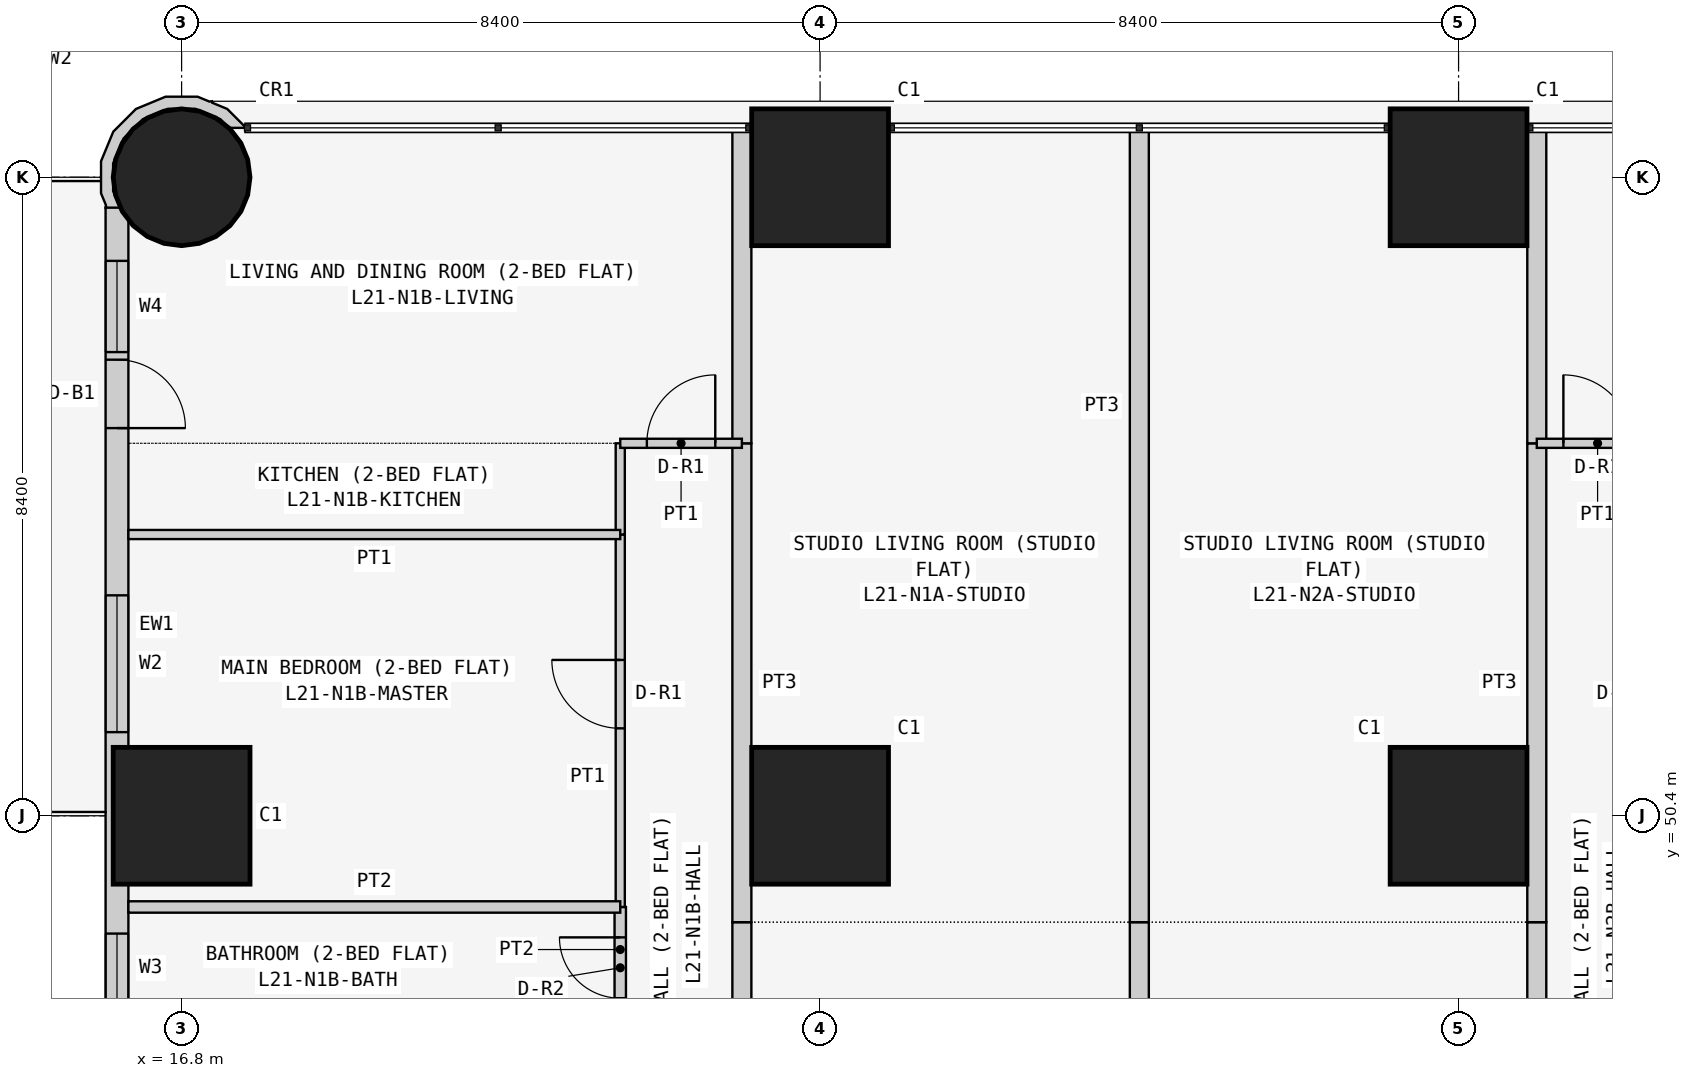
"""IFC4 building model, lengths in metres.
Left out: names, types, materials, properties, quantities, classifications, styles, units other than length and angle.
Written with IfcOpenShell. Run it as: python <this file> out.ifc"""

import sys

from ifc_helpers import new_model, si_unit, direction, frame, frame_2d, origin, origin_2d, place, context, subcontext, project, spatial, polyline, rectangle, circle, outline, extrude, element, fill, save


model = new_model("IFC4")
c1 = context("Model", 3, precision=1e-05, world=origin(), true_north=direction((0.0, 1.0)))
c2 = subcontext(c1, "Body", "Model", "MODEL_VIEW")
j1 = project(units=[si_unit("LENGTHUNIT", "METRE"), si_unit("PLANEANGLEUNIT", "RADIAN")], contexts=[c1])
p1 = place(None, origin())
s1 = spatial("IfcSite", under=j1, at=p1, CompositionType="ELEMENT")
p2 = place(p1, origin())
s2 = spatial("IfcBuilding", under=s1, at=p2, CompositionType="ELEMENT")
p3 = place(p2, frame((0.0, 0.0, 84.9)))
s3 = spatial("IfcBuildingStorey", under=s2, at=p3, CompositionType="ELEMENT", Elevation=84.9)
p4 = place(p3, frame((16.8, 50.4, 0.0), z_axis=(0.0, 0.0, 1.0), x_axis=(1.0, 0.0, 0.0)))
e1 = element("IfcColumn", 1, at=p4, inside=s3, PredefinedType="COLUMN", context=c2, shape_type="SweptSolid", body=[
    extrude(rectangle(XDim=1.8, YDim=1.8, at=origin_2d()), origin(), (0.0, 0.0, 1.0), 3.6),
])
p5 = place(p3, frame((16.8, 58.8, 0.0), z_axis=(0.0, 0.0, 1.0), x_axis=(1.0, 0.0, 0.0)))
e2 = element("IfcColumn", 2, at=p5, inside=s3, PredefinedType="COLUMN", context=c2, shape_type="SweptSolid", body=[
    extrude(circle(Radius=0.9, at=origin_2d()), origin(), (0.0, 0.0, 1.0), 3.6),
])
for number, where, z_axis, x_axis in (
    (3, (25.2, 50.4, 0.0), (0.0, 0.0, 1.0), (1.0, 0.0, 0.0)),
    (4, (25.2, 58.8, 0.0), (0.0, 0.0, 1.0), (1.0, 0.0, 0.0)),
    (5, (33.6, 50.4, 0.0), (0.0, 0.0, 1.0), (1.0, 0.0, 0.0)),
    (6, (33.6, 58.8, 0.0), (0.0, 0.0, 1.0), (1.0, 0.0, 0.0)),
):
    element("IfcColumn", number, at=place(p3, frame(where, z_axis=z_axis, x_axis=x_axis)), inside=s3, PredefinedType="COLUMN", context=c2, shape_type="SweptSolid", body=[
        extrude(rectangle(XDim=1.8, YDim=1.8, at=origin_2d()), origin(), (0.0, 0.0, 1.0), 3.6),
    ])
p6 = place(p3, frame((15.95, 58.4, 0.0), z_axis=(0.0, 0.0, 1.0), x_axis=(0.0, -1.0, 0.0)))
e7 = element("IfcWall", 7, at=p6, inside=s3, PredefinedType="SOLIDWALL", context=c2, shape_type="SweptSolid", body=[
    extrude(rectangle(XDim=15.7, YDim=0.3, at=frame_2d((7.85, 0.0))), origin(), (0.0, 0.0, 1.0), 3.45),
])
p7 = place(p6, frame((12.4, 0.0, 0.9)))
e8 = element("IfcOpeningElement", 8, at=p7, cuts=e7, PredefinedType="OPENING", context=c2, shape_type="SweptSolid", body=[
    extrude(rectangle(XDim=1.8, YDim=1.5, at=frame_2d((0.9, 0.75))), frame((0.0, 0.16, 0.0), z_axis=(0.0, -1.0, 0.0), x_axis=(1.0, 0.0, 0.0)), (0.0, 0.0, 1.0), 0.32),
])
p8 = place(p6, frame((9.55, 0.0, 1.5)))
e9 = element("IfcOpeningElement", 9, at=p8, cuts=e7, PredefinedType="OPENING", context=c2, shape_type="SweptSolid", body=[
    extrude(rectangle(XDim=0.9, YDim=0.7, at=frame_2d((0.45, 0.35))), frame((0.0, 0.16, 0.0), z_axis=(0.0, -1.0, 0.0), x_axis=(1.0, 0.0, 0.0)), (0.0, 0.0, 1.0), 0.32),
])
p9 = place(p6, frame((5.1, 0.0, 0.9)))
e10 = element("IfcOpeningElement", 10, at=p9, cuts=e7, PredefinedType="OPENING", context=c2, shape_type="SweptSolid", body=[
    extrude(rectangle(XDim=1.8, YDim=1.5, at=frame_2d((0.9, 0.75))), frame((0.0, 0.16, 0.0), z_axis=(0.0, -1.0, 0.0), x_axis=(1.0, 0.0, 0.0)), (0.0, 0.0, 1.0), 0.32),
])
p10 = place(p6, frame((2.0, 0.0, 0.0)))
e11 = element("IfcOpeningElement", 11, at=p10, cuts=e7, PredefinedType="OPENING", context=c2, shape_type="SweptSolid", body=[
    extrude(rectangle(XDim=0.9, YDim=2.4, at=frame_2d((0.45, 1.2))), frame((0.0, 0.16, 0.0), z_axis=(0.0, -1.0, 0.0), x_axis=(1.0, 0.0, 0.0)), (0.0, 0.0, 1.0), 0.32),
])
p11 = place(p6, frame((0.7, 0.0, 0.9)))
e12 = element("IfcOpeningElement", 12, at=p11, cuts=e7, PredefinedType="OPENING", context=c2, shape_type="SweptSolid", body=[
    extrude(rectangle(XDim=1.2, YDim=1.5, at=frame_2d((0.6, 0.75))), frame((0.0, 0.16, 0.0), z_axis=(0.0, -1.0, 0.0), x_axis=(1.0, 0.0, 0.0)), (0.0, 0.0, 1.0), 0.32),
])
p12 = place(p3, frame((17.567, 59.411, 0.0), z_axis=(0.0, 0.0, 1.0), x_axis=(-0.377204953059, 0.926129809145, 0.0)))
e13 = element("IfcWall", 13, at=p12, inside=s3, PredefinedType="SOLIDWALL", context=c2, shape_type="SweptSolid", body=[
    extrude(outline(polyline([(-0.27, 2.017), (-0.37, 1.841), (-0.102, 1.842), (0.23, 1.707), (0.484, 1.455), (0.624, 1.125), (0.626, 0.766), (0.491, 0.434), (0.239, 0.18), (0.09, 0.117), (0.011, -0.078), (0.024, -0.083), (0.329, 0.045), (0.48, 0.198), (0.499, 0.193), (0.508, 0.225), (0.626, 0.345), (0.785, 0.736), (0.782, 1.157), (0.619, 1.546), (0.319, 1.842), (-0.072, 2.002), (-0.24, 2.0), (-0.27, 2.017)])), origin(), (0.0, 0.0, 1.0), 3.45),
])
p13 = place(p3, frame((24.171, 49.0, 0.0), z_axis=(0.0, 0.0, 1.0), x_axis=(0.0, -1.0, 0.0)))
e14 = element("IfcWall", 14, at=p13, inside=s3, PredefinedType="PARTITIONING", context=c2, shape_type="SweptSolid", body=[
    extrude(rectangle(XDim=3.6, YDim=0.25, at=frame_2d((1.8, 0.0))), origin(), (0.0, 0.0, 1.0), 3.45),
])
p14 = place(p3, frame((29.4, 45.4, 0.0), z_axis=(0.0, 0.0, 1.0), x_axis=(0.0, 1.0, 0.0)))
e15 = element("IfcWall", 15, at=p14, inside=s3, PredefinedType="PARTITIONING", context=c2, shape_type="SweptSolid", body=[
    extrude(rectangle(XDim=3.6, YDim=0.25, at=frame_2d((1.8, 0.0))), origin(), (0.0, 0.0, 1.0), 2.848),
])
p15 = place(p3, frame((24.171, 55.3, 0.0), z_axis=(0.0, 0.0, 1.0), x_axis=(0.0, -1.0, 0.0)))
e16 = element("IfcWall", 16, at=p15, inside=s3, PredefinedType="PARTITIONING", context=c2, shape_type="SweptSolid", body=[
    extrude(rectangle(XDim=6.3, YDim=0.25, at=frame_2d((3.15, 0.0))), origin(), (0.0, 0.0, 1.0), 3.45),
])
p16 = place(p3, frame((24.171, 59.45, 0.0), z_axis=(0.0, 0.0, 1.0), x_axis=(0.0, -1.0, 0.0)))
e17 = element("IfcWall", 17, at=p16, inside=s3, PredefinedType="PARTITIONING", context=c2, shape_type="SweptSolid", body=[
    extrude(rectangle(XDim=4.15, YDim=0.25, at=frame_2d((2.075, 0.0))), origin(), (0.0, 0.0, 1.0), 3.45),
])
p17 = place(p3, frame((29.4, 49.0, 0.0), z_axis=(0.0, 0.0, 1.0), x_axis=(0.0, 1.0, 0.0)))
e18 = element("IfcWall", 18, at=p17, inside=s3, PredefinedType="PARTITIONING", context=c2, shape_type="SweptSolid", body=[
    extrude(rectangle(XDim=10.45, YDim=0.25, at=frame_2d((5.225, 0.0))), origin(), (0.0, 0.0, 1.0), 2.848),
])
p18 = place(p3, frame((22.571, 49.2, 0.0), z_axis=(0.0, 0.0, 1.0), x_axis=(0.0, -1.0, 0.0)))
e19 = element("IfcWall", 19, at=p18, inside=s3, PredefinedType="PARTITIONING", context=c2, shape_type="SweptSolid", body=[
    extrude(rectangle(XDim=1.6, YDim=0.15, at=frame_2d((0.8, 0.0))), origin(), (0.0, 0.0, 1.0), 3.45),
])
p19 = place(p18, frame((0.4, 0.0, 0.0)))
e20 = element("IfcOpeningElement", 20, at=p19, cuts=e19, PredefinedType="OPENING", context=c2, shape_type="SweptSolid", body=[
    extrude(rectangle(XDim=0.8, YDim=2.1, at=frame_2d((0.4, 1.05))), frame((0.0, 0.085, 0.0), z_axis=(0.0, -1.0, 0.0), x_axis=(1.0, 0.0, 0.0)), (0.0, 0.0, 1.0), 0.17),
])
p20 = place(p3, frame((22.571, 54.1, 0.0), z_axis=(0.0, 0.0, 1.0), x_axis=(0.0, -1.0, 0.0)))
e21 = element("IfcWall", 21, at=p20, inside=s3, PredefinedType="PARTITIONING", context=c2, shape_type="SweptSolid", body=[
    extrude(rectangle(XDim=4.9, YDim=0.12, at=frame_2d((2.45, 0.0))), origin(), (0.0, 0.0, 1.0), 3.45),
])
p21 = place(p20, frame((1.65, 0.0, 0.0)))
e22 = element("IfcOpeningElement", 22, at=p21, cuts=e21, PredefinedType="OPENING", context=c2, shape_type="SweptSolid", body=[
    extrude(rectangle(XDim=0.9, YDim=2.1, at=frame_2d((0.45, 1.05))), frame((0.0, 0.07, 0.0), z_axis=(0.0, -1.0, 0.0), x_axis=(1.0, 0.0, 0.0)), (0.0, 0.0, 1.0), 0.14),
])
p22 = place(p3, frame((22.571, 55.3, 0.0), z_axis=(0.0, 0.0, 1.0), x_axis=(0.0, -1.0, 0.0)))
e23 = element("IfcWall", 23, at=p22, inside=s3, PredefinedType="PARTITIONING", context=c2, shape_type="SweptSolid", body=[
    extrude(rectangle(XDim=1.2, YDim=0.12, at=frame_2d((0.6, 0.0))), origin(), (0.0, 0.0, 1.0), 3.45),
])
p23 = place(p3, frame((24.171, 55.3, 0.0), z_axis=(0.0, 0.0, 1.0), x_axis=(-1.0, 0.0, 0.0)))
e24 = element("IfcWall", 24, at=p23, inside=s3, PredefinedType="PARTITIONING", context=c2, shape_type="SweptSolid", body=[
    extrude(rectangle(XDim=1.6, YDim=0.12, at=frame_2d((0.8, 0.0))), origin(), (0.0, 0.0, 1.0), 3.45),
])
p24 = place(p23, frame((0.35, 0.0, 0.0)))
e25 = element("IfcOpeningElement", 25, at=p24, cuts=e24, PredefinedType="OPENING", context=c2, shape_type="SweptSolid", body=[
    extrude(rectangle(XDim=0.9, YDim=2.1, at=frame_2d((0.45, 1.05))), frame((0.0, 0.07, 0.0), z_axis=(0.0, -1.0, 0.0), x_axis=(1.0, 0.0, 0.0)), (0.0, 0.0, 1.0), 0.14),
])
p25 = place(p3, frame((22.571, 49.2, 0.0), z_axis=(0.0, 0.0, 1.0), x_axis=(-1.0, 0.0, 0.0)))
e26 = element("IfcWall", 26, at=p25, inside=s3, PredefinedType="PARTITIONING", context=c2, shape_type="SweptSolid", body=[
    extrude(rectangle(XDim=6.471, YDim=0.15, at=frame_2d((3.235, 0.0))), origin(), (0.0, 0.0, 1.0), 3.45),
])
p26 = place(p3, frame((22.571, 54.1, 0.0), z_axis=(0.0, 0.0, 1.0), x_axis=(-1.0, 0.0, 0.0)))
e27 = element("IfcWall", 27, at=p26, inside=s3, PredefinedType="PARTITIONING", context=c2, shape_type="SweptSolid", body=[
    extrude(rectangle(XDim=6.471, YDim=0.12, at=frame_2d((3.235, 0.0))), origin(), (0.0, 0.0, 1.0), 3.45),
])
p27 = place(p3, frame((34.629, 49.0, 0.0), z_axis=(0.0, 0.0, 1.0), x_axis=(0.0, -1.0, 0.0)))
e28 = element("IfcWall", 28, at=p27, inside=s3, PredefinedType="PARTITIONING", context=c2, shape_type="SweptSolid", body=[
    extrude(rectangle(XDim=3.6, YDim=0.25, at=frame_2d((1.8, 0.0))), origin(), (0.0, 0.0, 1.0), 3.45),
])
p28 = place(p3, frame((34.629, 55.3, 0.0), z_axis=(0.0, 0.0, 1.0), x_axis=(0.0, -1.0, 0.0)))
e29 = element("IfcWall", 29, at=p28, inside=s3, PredefinedType="PARTITIONING", context=c2, shape_type="SweptSolid", body=[
    extrude(rectangle(XDim=6.3, YDim=0.25, at=frame_2d((3.15, 0.0))), origin(), (0.0, 0.0, 1.0), 3.45),
])
p29 = place(p3, frame((34.629, 59.45, 0.0), z_axis=(0.0, 0.0, 1.0), x_axis=(0.0, -1.0, 0.0)))
e30 = element("IfcWall", 30, at=p29, inside=s3, PredefinedType="PARTITIONING", context=c2, shape_type="SweptSolid", body=[
    extrude(rectangle(XDim=4.15, YDim=0.25, at=frame_2d((2.075, 0.0))), origin(), (0.0, 0.0, 1.0), 3.45),
])
p30 = place(p3, frame((34.629, 55.3, 0.0), z_axis=(0.0, 0.0, 1.0), x_axis=(1.0, 0.0, 0.0)))
e31 = element("IfcWall", 31, at=p30, inside=s3, PredefinedType="PARTITIONING", context=c2, shape_type="SweptSolid", body=[
    extrude(rectangle(XDim=1.6, YDim=0.12, at=frame_2d((0.8, 0.0))), origin(), (0.0, 0.0, 1.0), 3.45),
])
p31 = place(p30, frame((0.35, 0.0, 0.0)))
e32 = element("IfcOpeningElement", 32, at=p31, cuts=e31, PredefinedType="OPENING", context=c2, shape_type="SweptSolid", body=[
    extrude(rectangle(XDim=0.9, YDim=2.1, at=frame_2d((0.45, 1.05))), frame((0.0, 0.07, 0.0), z_axis=(0.0, -1.0, 0.0), x_axis=(1.0, 0.0, 0.0)), (0.0, 0.0, 1.0), 0.14),
])
p32 = place(p8, origin())
e33 = element("IfcWindow", 33, at=p32, inside=s3, PartitioningType="SINGLE_PANEL", PredefinedType="WINDOW", context=c2, shape_type="SweptSolid", body=[
    extrude(rectangle(XDim=0.9, YDim=0.7, at=frame_2d((0.45, 0.35))), frame((0.0, 0.03, 0.0), z_axis=(0.0, -1.0, 0.0), x_axis=(1.0, 0.0, 0.0)), (0.0, 0.0, 1.0), 0.06),
])
fill(e9, e33)
p33 = place(p9, origin())
e34 = element("IfcWindow", 34, at=p33, inside=s3, PartitioningType="SINGLE_PANEL", PredefinedType="WINDOW", context=c2, shape_type="SweptSolid", body=[
    extrude(rectangle(XDim=1.8, YDim=1.5, at=frame_2d((0.9, 0.75))), frame((0.0, 0.03, 0.0), z_axis=(0.0, -1.0, 0.0), x_axis=(1.0, 0.0, 0.0)), (0.0, 0.0, 1.0), 0.06),
])
fill(e10, e34)
p34 = place(p10, origin())
e35 = element("IfcDoor", 35, at=p34, inside=s3, OperationType="SINGLE_SWING_RIGHT", PredefinedType="DOOR", context=c2, shape_type="SweptSolid", body=[
    extrude(rectangle(XDim=0.9, YDim=2.4, at=frame_2d((0.45, 1.2))), frame((0.0, 0.025, 0.0), z_axis=(0.0, -1.0, 0.0), x_axis=(1.0, 0.0, 0.0)), (0.0, 0.0, 1.0), 0.05),
])
fill(e11, e35)
p35 = place(p11, origin())
e36 = element("IfcWindow", 36, at=p35, inside=s3, PartitioningType="SINGLE_PANEL", PredefinedType="WINDOW", context=c2, shape_type="SweptSolid", body=[
    extrude(rectangle(XDim=1.2, YDim=1.5, at=frame_2d((0.6, 0.75))), frame((0.0, 0.03, 0.0), z_axis=(0.0, -1.0, 0.0), x_axis=(1.0, 0.0, 0.0)), (0.0, 0.0, 1.0), 0.06),
])
fill(e12, e36)
p36 = place(p19, frame((0.8, 0.0, 0.0), z_axis=(0.0, 0.0, 1.0), x_axis=(-1.0, 0.0, 0.0)))
e37 = element("IfcDoor", 37, at=p36, inside=s3, OperationType="SINGLE_SWING_RIGHT", PredefinedType="DOOR", context=c2, shape_type="SweptSolid", body=[
    extrude(rectangle(XDim=0.8, YDim=2.1, at=frame_2d((0.4, 1.05))), frame((0.0, 0.025, 0.0), z_axis=(0.0, -1.0, 0.0), x_axis=(1.0, 0.0, 0.0)), (0.0, 0.0, 1.0), 0.05),
])
fill(e20, e37)
p37 = place(p21, frame((0.9, 0.0, 0.0), z_axis=(0.0, 0.0, 1.0), x_axis=(-1.0, 0.0, 0.0)))
e38 = element("IfcDoor", 38, at=p37, inside=s3, OperationType="SINGLE_SWING_RIGHT", PredefinedType="DOOR", context=c2, shape_type="SweptSolid", body=[
    extrude(rectangle(XDim=0.9, YDim=2.1, at=frame_2d((0.45, 1.05))), frame((0.0, 0.025, 0.0), z_axis=(0.0, -1.0, 0.0), x_axis=(1.0, 0.0, 0.0)), (0.0, 0.0, 1.0), 0.05),
])
fill(e22, e38)
p38 = place(p24, frame((0.9, 0.0, 0.0), z_axis=(0.0, 0.0, 1.0), x_axis=(-1.0, 0.0, 0.0)))
e39 = element("IfcDoor", 39, at=p38, inside=s3, OperationType="SINGLE_SWING_RIGHT", PredefinedType="DOOR", context=c2, shape_type="SweptSolid", body=[
    extrude(rectangle(XDim=0.9, YDim=2.1, at=frame_2d((0.45, 1.05))), frame((0.0, 0.025, 0.0), z_axis=(0.0, -1.0, 0.0), x_axis=(1.0, 0.0, 0.0)), (0.0, 0.0, 1.0), 0.05),
])
fill(e25, e39)
p39 = place(p31, origin())
e40 = element("IfcDoor", 40, at=p39, inside=s3, OperationType="SINGLE_SWING_LEFT", PredefinedType="DOOR", context=c2, shape_type="SweptSolid", body=[
    extrude(rectangle(XDim=0.9, YDim=2.1, at=frame_2d((0.45, 1.05))), frame((0.0, 0.025, 0.0), z_axis=(0.0, -1.0, 0.0), x_axis=(1.0, 0.0, 0.0)), (0.0, 0.0, 1.0), 0.05),
])
fill(e32, e40)
save(model, sys.argv[1])
